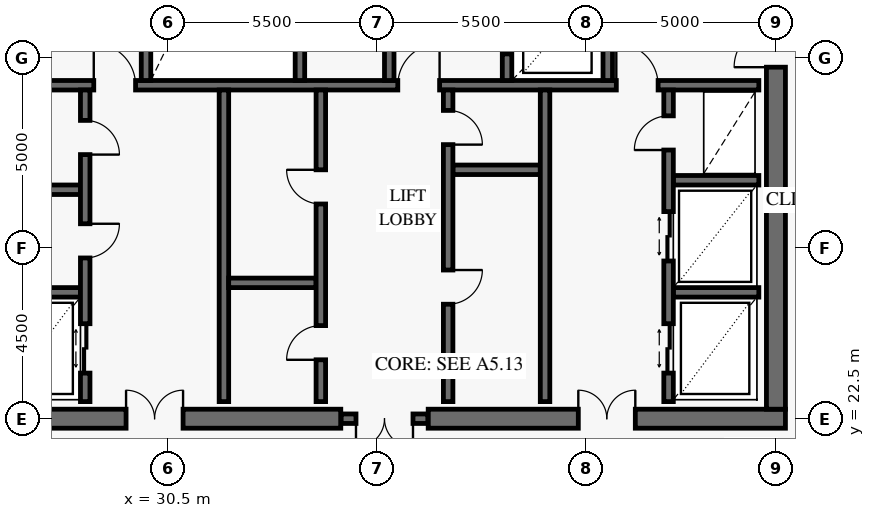
"""IFC4 building model, lengths in metres.
Left out: names, types, materials, properties, quantities, classifications, styles, units other than length and angle.
Written with IfcOpenShell. Run it as: python <this file> out.ifc"""

import sys

from ifc_helpers import new_model, si_unit, direction, frame, frame_2d, origin, place, context, subcontext, project, spatial, rectangle, extrude, element, fill, save


model = new_model("IFC4")
c1 = context("Model", 3, precision=1e-05, world=origin(), true_north=direction((0.0, 1.0)))
c2 = subcontext(c1, "Body", "Model", "MODEL_VIEW")
j1 = project(units=[si_unit("LENGTHUNIT", "METRE"), si_unit("PLANEANGLEUNIT", "RADIAN")], contexts=[c1])
p1 = place(None, origin())
s1 = spatial("IfcSite", under=j1, at=p1, CompositionType="ELEMENT")
p2 = place(p1, origin())
s2 = spatial("IfcBuilding", under=s1, at=p2, CompositionType="ELEMENT")
p3 = place(p2, frame((0.0, 0.0, 353.8)))
s3 = spatial("IfcBuildingStorey", under=s2, at=p3, CompositionType="ELEMENT", Elevation=353.8)
p4 = place(p3, frame((25.25, 22.5, 0.0), z_axis=(0.0, 0.0, 1.0), x_axis=(1.0, 0.0, 0.0)))
e1 = element("IfcWall", 1, at=p4, inside=s3, PredefinedType="SHEAR", context=c2, shape_type="SweptSolid", body=[
    extrude(rectangle(XDim=9.8, YDim=0.5, at=frame_2d((4.9, 0.0))), origin(), (0.0, 0.0, 1.0), 3.8),
])
p5 = place(p4, frame((4.15, 0.0, 0.0)))
e2 = element("IfcOpeningElement", 2, at=p5, cuts=e1, PredefinedType="OPENING", context=c2, shape_type="SweptSolid", body=[
    extrude(rectangle(XDim=1.5, YDim=2.15, at=frame_2d((0.75, 1.075))), frame((0.0, 0.262, 0.0), z_axis=(0.0, -1.0, 0.0), x_axis=(1.0, 0.0, 0.0)), (0.0, 0.0, 1.0), 0.524),
])
p6 = place(p3, frame((37.35, 22.5, 0.0), z_axis=(0.0, 0.0, 1.0), x_axis=(1.0, 0.0, 0.0)))
e3 = element("IfcWall", 3, at=p6, inside=s3, PredefinedType="SHEAR", context=c2, shape_type="SweptSolid", body=[
    extrude(rectangle(XDim=9.4, YDim=0.5, at=frame_2d((4.7, 0.0))), origin(), (0.0, 0.0, 1.0), 3.8),
])
p7 = place(p6, frame((3.95, 0.0, 0.0)))
e4 = element("IfcOpeningElement", 4, at=p7, cuts=e3, PredefinedType="OPENING", context=c2, shape_type="SweptSolid", body=[
    extrude(rectangle(XDim=1.5, YDim=2.15, at=frame_2d((0.75, 1.075))), frame((0.0, 0.262, 0.0), z_axis=(0.0, -1.0, 0.0), x_axis=(1.0, 0.0, 0.0)), (0.0, 0.0, 1.0), 0.524),
])
p8 = place(p3, frame((46.5, 22.75, 0.0), z_axis=(0.0, 0.0, 1.0), x_axis=(0.0, 1.0, 0.0)))
e5 = element("IfcWall", 5, at=p8, inside=s3, PredefinedType="SHEAR", context=c2, shape_type="SweptSolid", body=[
    extrude(rectangle(XDim=18.5, YDim=0.5, at=frame_2d((9.25, 0.0))), origin(), (0.0, 0.0, 1.0), 3.8),
])
p9 = place(p8, frame((9.0, 0.0, 0.0)))
e6 = element("IfcOpeningElement", 6, at=p9, cuts=e5, PredefinedType="OPENING", context=c2, shape_type="SweptSolid", body=[
    extrude(rectangle(XDim=1.1, YDim=2.15, at=frame_2d((0.55, 1.075))), frame((0.0, 0.262, 0.0), z_axis=(0.0, -1.0, 0.0), x_axis=(1.0, 0.0, 0.0)), (0.0, 0.0, 1.0), 0.524),
])
p10 = place(p3, frame((35.06, 22.5, 0.0), z_axis=(0.0, 0.0, 1.0), x_axis=(1.0, 0.0, 0.0)))
e7 = element("IfcWall", 7, at=p10, inside=s3, PredefinedType="SOLIDWALL", context=c2, shape_type="SweptSolid", body=[
    extrude(rectangle(XDim=2.28, YDim=0.25, at=frame_2d((1.14, 0.0))), origin(), (0.0, 0.0, 1.0), 3.8),
])
p11 = place(p10, frame((0.39, 0.0, 0.0)))
e8 = element("IfcOpeningElement", 8, at=p11, cuts=e7, PredefinedType="OPENING", context=c2, shape_type="SweptSolid", body=[
    extrude(rectangle(XDim=1.5, YDim=2.15, at=frame_2d((0.75, 1.075))), frame((0.0, 0.137, 0.0), z_axis=(0.0, -1.0, 0.0), x_axis=(1.0, 0.0, 0.0)), (0.0, 0.0, 1.0), 0.274),
])
p12 = place(p3, frame((25.95, 31.275, 0.0), z_axis=(0.0, 0.0, 1.0), x_axis=(1.0, 0.0, 0.0)))
e9 = element("IfcWall", 9, at=p12, inside=s3, PredefinedType="SOLIDWALL", context=c2, shape_type="SweptSolid", body=[
    extrude(rectangle(XDim=20.1, YDim=0.25, at=frame_2d((10.05, 0.0))), origin(), (0.0, 0.0, 1.0), 3.8),
])
p13 = place(p12, frame((2.6, 0.0, 0.0)))
e10 = element("IfcOpeningElement", 10, at=p13, cuts=e9, PredefinedType="OPENING", context=c2, shape_type="SweptSolid", body=[
    extrude(rectangle(XDim=1.1, YDim=2.15, at=frame_2d((0.55, 1.075))), frame((0.0, 0.137, 0.0), z_axis=(0.0, -1.0, 0.0), x_axis=(1.0, 0.0, 0.0)), (0.0, 0.0, 1.0), 0.274),
])
p14 = place(p12, frame((10.6, 0.0, 0.0)))
e11 = element("IfcOpeningElement", 11, at=p14, cuts=e9, PredefinedType="OPENING", context=c2, shape_type="SweptSolid", body=[
    extrude(rectangle(XDim=1.1, YDim=2.15, at=frame_2d((0.55, 1.075))), frame((0.0, 0.137, 0.0), z_axis=(0.0, -1.0, 0.0), x_axis=(1.0, 0.0, 0.0)), (0.0, 0.0, 1.0), 0.274),
])
p15 = place(p12, frame((16.35, 0.0, 0.0)))
e12 = element("IfcOpeningElement", 12, at=p15, cuts=e9, PredefinedType="OPENING", context=c2, shape_type="SweptSolid", body=[
    extrude(rectangle(XDim=1.1, YDim=2.15, at=frame_2d((0.55, 1.075))), frame((0.0, 0.137, 0.0), z_axis=(0.0, -1.0, 0.0), x_axis=(1.0, 0.0, 0.0)), (0.0, 0.0, 1.0), 0.274),
])
for number, where, z_axis, x_axis in (
    (13, (29.925, 31.4, 0.0), (0.0, 0.0, 1.0), (0.0, 1.0, 0.0)),
    (14, (33.975, 31.4, 0.0), (0.0, 0.0, 1.0), (0.0, 1.0, 0.0)),
    (15, (42.075, 31.4, 0.0), (0.0, 0.0, 1.0), (0.0, 1.0, 0.0)),
):
    element("IfcWall", number, at=place(p3, frame(where, z_axis=z_axis, x_axis=x_axis)), inside=s3, PredefinedType="SOLIDWALL", context=c2, shape_type="SweptSolid", body=[
        extrude(rectangle(XDim=9.7, YDim=0.25, at=frame_2d((4.85, 0.0))), origin(), (0.0, 0.0, 1.0), 3.8),
    ])
p16 = place(p3, frame((36.325, 31.4, 0.0), z_axis=(0.0, 0.0, 1.0), x_axis=(0.0, 1.0, 0.0)))
e16 = element("IfcWall", 16, at=p16, inside=s3, PredefinedType="SOLIDWALL", context=c2, shape_type="SweptSolid", body=[
    extrude(rectangle(XDim=9.65, YDim=0.25, at=frame_2d((4.825, 0.0))), origin(), (0.0, 0.0, 1.0), 3.8),
])
p17 = place(p16, frame((2.965, 0.0, 0.0)))
e17 = element("IfcOpeningElement", 17, at=p17, cuts=e16, PredefinedType="OPENING", context=c2, shape_type="SweptSolid", body=[
    extrude(rectangle(XDim=0.9, YDim=2.1, at=frame_2d((0.45, 1.05))), frame((0.0, 0.137, 0.0), z_axis=(0.0, -1.0, 0.0), x_axis=(1.0, 0.0, 0.0)), (0.0, 0.0, 1.0), 0.274),
])
p18 = place(p16, frame((7.885, 0.0, 0.0)))
e18 = element("IfcOpeningElement", 18, at=p18, cuts=e16, PredefinedType="OPENING", context=c2, shape_type="SweptSolid", body=[
    extrude(rectangle(XDim=0.9, YDim=2.1, at=frame_2d((0.45, 1.05))), frame((0.0, 0.137, 0.0), z_axis=(0.0, -1.0, 0.0), x_axis=(1.0, 0.0, 0.0)), (0.0, 0.0, 1.0), 0.274),
])
p19 = place(p3, frame((39.425, 31.4, 0.0), z_axis=(0.0, 0.0, 1.0), x_axis=(0.0, 1.0, 0.0)))
e19 = element("IfcWall", 19, at=p19, inside=s3, PredefinedType="SOLIDWALL", context=c2, shape_type="SweptSolid", body=[
    extrude(rectangle(XDim=9.65, YDim=0.25, at=frame_2d((4.825, 0.0))), origin(), (0.0, 0.0, 1.0), 3.8),
])
p20 = place(p19, frame((0.7, 0.0, 0.0)))
e20 = element("IfcOpeningElement", 20, at=p20, cuts=e19, PredefinedType="OPENING", context=c2, shape_type="SweptSolid", body=[
    extrude(rectangle(XDim=1.1, YDim=2.2, at=frame_2d((0.55, 1.1))), frame((0.0, 0.137, 0.0), z_axis=(0.0, -1.0, 0.0), x_axis=(1.0, 0.0, 0.0)), (0.0, 0.0, 1.0), 0.274),
])
p21 = place(p19, frame((3.45, 0.0, 0.0)))
e21 = element("IfcOpeningElement", 21, at=p21, cuts=e19, PredefinedType="OPENING", context=c2, shape_type="SweptSolid", body=[
    extrude(rectangle(XDim=1.1, YDim=2.2, at=frame_2d((0.55, 1.1))), frame((0.0, 0.137, 0.0), z_axis=(0.0, -1.0, 0.0), x_axis=(1.0, 0.0, 0.0)), (0.0, 0.0, 1.0), 0.274),
])
p22 = place(p19, frame((6.2, 0.0, 0.0)))
e22 = element("IfcOpeningElement", 22, at=p22, cuts=e19, PredefinedType="OPENING", context=c2, shape_type="SweptSolid", body=[
    extrude(rectangle(XDim=1.1, YDim=2.2, at=frame_2d((0.55, 1.1))), frame((0.0, 0.137, 0.0), z_axis=(0.0, -1.0, 0.0), x_axis=(1.0, 0.0, 0.0)), (0.0, 0.0, 1.0), 0.274),
])
p23 = place(p19, frame((8.47, 0.0, 0.0)))
e23 = element("IfcOpeningElement", 23, at=p23, cuts=e19, PredefinedType="OPENING", context=c2, shape_type="SweptSolid", body=[
    extrude(rectangle(XDim=0.9, YDim=2.1, at=frame_2d((0.45, 1.05))), frame((0.0, 0.137, 0.0), z_axis=(0.0, -1.0, 0.0), x_axis=(1.0, 0.0, 0.0)), (0.0, 0.0, 1.0), 0.274),
])
for number, where, z_axis, x_axis in (
    (24, (25.95, 25.825, 0.0), (0.0, 0.0, 1.0), (1.0, 0.0, 0.0)),
    (25, (25.95, 28.525, 0.0), (0.0, 0.0, 1.0), (1.0, 0.0, 0.0)),
):
    element("IfcWall", number, at=place(p3, frame(where, z_axis=z_axis, x_axis=x_axis)), inside=s3, PredefinedType="SOLIDWALL", context=c2, shape_type="SweptSolid", body=[
        extrude(rectangle(XDim=2.25, YDim=0.25, at=frame_2d((1.125, 0.0))), origin(), (0.0, 0.0, 1.0), 3.8),
    ])
p24 = place(p3, frame((28.325, 22.95, 0.0), z_axis=(0.0, 0.0, 1.0), x_axis=(0.0, 1.0, 0.0)))
e26 = element("IfcWall", 26, at=p24, inside=s3, PredefinedType="SOLIDWALL", context=c2, shape_type="SweptSolid", body=[
    extrude(rectangle(XDim=8.2, YDim=0.25, at=frame_2d((4.1, 0.0))), origin(), (0.0, 0.0, 1.0), 3.8),
])
p25 = place(p24, frame((0.75, 0.0, 0.0)))
e27 = element("IfcOpeningElement", 27, at=p25, cuts=e26, PredefinedType="OPENING", context=c2, shape_type="SweptSolid", body=[
    extrude(rectangle(XDim=1.3, YDim=2.3, at=frame_2d((0.65, 1.15))), frame((0.0, 0.137, 0.0), z_axis=(0.0, -1.0, 0.0), x_axis=(1.0, 0.0, 0.0)), (0.0, 0.0, 1.0), 0.274),
])
p26 = place(p24, frame((3.78, 0.0, 0.0)))
e28 = element("IfcOpeningElement", 28, at=p26, cuts=e26, PredefinedType="OPENING", context=c2, shape_type="SweptSolid", body=[
    extrude(rectangle(XDim=0.9, YDim=2.1, at=frame_2d((0.45, 1.05))), frame((0.0, 0.137, 0.0), z_axis=(0.0, -1.0, 0.0), x_axis=(1.0, 0.0, 0.0)), (0.0, 0.0, 1.0), 0.274),
])
p27 = place(p24, frame((6.5, 0.0, 0.0)))
e29 = element("IfcOpeningElement", 29, at=p27, cuts=e26, PredefinedType="OPENING", context=c2, shape_type="SweptSolid", body=[
    extrude(rectangle(XDim=0.9, YDim=2.1, at=frame_2d((0.45, 1.05))), frame((0.0, 0.137, 0.0), z_axis=(0.0, -1.0, 0.0), x_axis=(1.0, 0.0, 0.0)), (0.0, 0.0, 1.0), 0.274),
])
p28 = place(p3, frame((31.975, 22.95, 0.0), z_axis=(0.0, 0.0, 1.0), x_axis=(0.0, 1.0, 0.0)))
e30 = element("IfcWall", 30, at=p28, inside=s3, PredefinedType="SOLIDWALL", context=c2, shape_type="SweptSolid", body=[
    extrude(rectangle(XDim=8.2, YDim=0.25, at=frame_2d((4.1, 0.0))), origin(), (0.0, 0.0, 1.0), 3.8),
])
p29 = place(p3, frame((32.1, 26.075, 0.0), z_axis=(0.0, 0.0, 1.0), x_axis=(1.0, 0.0, 0.0)))
e31 = element("IfcWall", 31, at=p29, inside=s3, PredefinedType="SOLIDWALL", context=c2, shape_type="SweptSolid", body=[
    extrude(rectangle(XDim=2.3, YDim=0.25, at=frame_2d((1.15, 0.0))), origin(), (0.0, 0.0, 1.0), 3.8),
])
p30 = place(p3, frame((34.525, 22.95, 0.0), z_axis=(0.0, 0.0, 1.0), x_axis=(0.0, 1.0, 0.0)))
e32 = element("IfcWall", 32, at=p30, inside=s3, PredefinedType="SOLIDWALL", context=c2, shape_type="SweptSolid", body=[
    extrude(rectangle(XDim=8.2, YDim=0.25, at=frame_2d((4.1, 0.0))), origin(), (0.0, 0.0, 1.0), 3.8),
])
p31 = place(p30, frame((1.1, 0.0, 0.0)))
e33 = element("IfcOpeningElement", 33, at=p31, cuts=e32, PredefinedType="OPENING", context=c2, shape_type="SweptSolid", body=[
    extrude(rectangle(XDim=0.9, YDim=2.1, at=frame_2d((0.45, 1.05))), frame((0.0, 0.137, 0.0), z_axis=(0.0, -1.0, 0.0), x_axis=(1.0, 0.0, 0.0)), (0.0, 0.0, 1.0), 0.274),
])
p32 = place(p30, frame((5.2, 0.0, 0.0)))
e34 = element("IfcOpeningElement", 34, at=p32, cuts=e32, PredefinedType="OPENING", context=c2, shape_type="SweptSolid", body=[
    extrude(rectangle(XDim=0.9, YDim=2.1, at=frame_2d((0.45, 1.05))), frame((0.0, 0.137, 0.0), z_axis=(0.0, -1.0, 0.0), x_axis=(1.0, 0.0, 0.0)), (0.0, 0.0, 1.0), 0.274),
])
p33 = place(p3, frame((38.0, 29.05, 0.0), z_axis=(0.0, 0.0, 1.0), x_axis=(1.0, 0.0, 0.0)))
e35 = element("IfcWall", 35, at=p33, inside=s3, PredefinedType="SOLIDWALL", context=c2, shape_type="SweptSolid", body=[
    extrude(rectangle(XDim=2.3, YDim=0.25, at=frame_2d((1.15, 0.0))), origin(), (0.0, 0.0, 1.0), 3.8),
])
p34 = place(p3, frame((37.875, 22.95, 0.0), z_axis=(0.0, 0.0, 1.0), x_axis=(0.0, 1.0, 0.0)))
e36 = element("IfcWall", 36, at=p34, inside=s3, PredefinedType="SOLIDWALL", context=c2, shape_type="SweptSolid", body=[
    extrude(rectangle(XDim=8.2, YDim=0.25, at=frame_2d((4.1, 0.0))), origin(), (0.0, 0.0, 1.0), 3.8),
])
p35 = place(p34, frame((2.562, 0.0, 0.0)))
e37 = element("IfcOpeningElement", 37, at=p35, cuts=e36, PredefinedType="OPENING", context=c2, shape_type="SweptSolid", body=[
    extrude(rectangle(XDim=0.9, YDim=2.1, at=frame_2d((0.45, 1.05))), frame((0.0, 0.137, 0.0), z_axis=(0.0, -1.0, 0.0), x_axis=(1.0, 0.0, 0.0)), (0.0, 0.0, 1.0), 0.274),
])
p36 = place(p34, frame((6.762, 0.0, 0.0)))
e38 = element("IfcOpeningElement", 38, at=p36, cuts=e36, PredefinedType="OPENING", context=c2, shape_type="SweptSolid", body=[
    extrude(rectangle(XDim=0.9, YDim=2.1, at=frame_2d((0.45, 1.05))), frame((0.0, 0.137, 0.0), z_axis=(0.0, -1.0, 0.0), x_axis=(1.0, 0.0, 0.0)), (0.0, 0.0, 1.0), 0.274),
])
p37 = place(p3, frame((40.425, 22.95, 0.0), z_axis=(0.0, 0.0, 1.0), x_axis=(0.0, 1.0, 0.0)))
e39 = element("IfcWall", 39, at=p37, inside=s3, PredefinedType="SOLIDWALL", context=c2, shape_type="SweptSolid", body=[
    extrude(rectangle(XDim=8.2, YDim=0.25, at=frame_2d((4.1, 0.0))), origin(), (0.0, 0.0, 1.0), 3.8),
])
for number, where, z_axis, x_axis in (
    (40, (43.8, 25.825, 0.0), (0.0, 0.0, 1.0), (1.0, 0.0, 0.0)),
    (41, (43.8, 28.775, 0.0), (0.0, 0.0, 1.0), (1.0, 0.0, 0.0)),
):
    element("IfcWall", number, at=place(p3, frame(where, z_axis=z_axis, x_axis=x_axis)), inside=s3, PredefinedType="SOLIDWALL", context=c2, shape_type="SweptSolid", body=[
        extrude(rectangle(XDim=2.25, YDim=0.25, at=frame_2d((1.125, 0.0))), origin(), (0.0, 0.0, 1.0), 3.8),
    ])
p38 = place(p3, frame((43.675, 22.95, 0.0), z_axis=(0.0, 0.0, 1.0), x_axis=(0.0, 1.0, 0.0)))
e42 = element("IfcWall", 42, at=p38, inside=s3, PredefinedType="SOLIDWALL", context=c2, shape_type="SweptSolid", body=[
    extrude(rectangle(XDim=8.2, YDim=0.25, at=frame_2d((4.1, 0.0))), origin(), (0.0, 0.0, 1.0), 3.8),
])
p39 = place(p38, frame((0.75, 0.0, 0.0)))
e43 = element("IfcOpeningElement", 43, at=p39, cuts=e42, PredefinedType="OPENING", context=c2, shape_type="SweptSolid", body=[
    extrude(rectangle(XDim=1.3, YDim=2.3, at=frame_2d((0.65, 1.15))), frame((0.0, 0.137, 0.0), z_axis=(0.0, -1.0, 0.0), x_axis=(1.0, 0.0, 0.0)), (0.0, 0.0, 1.0), 0.274),
])
p40 = place(p38, frame((3.7, 0.0, 0.0)))
e44 = element("IfcOpeningElement", 44, at=p40, cuts=e42, PredefinedType="OPENING", context=c2, shape_type="SweptSolid", body=[
    extrude(rectangle(XDim=1.3, YDim=2.3, at=frame_2d((0.65, 1.15))), frame((0.0, 0.137, 0.0), z_axis=(0.0, -1.0, 0.0), x_axis=(1.0, 0.0, 0.0)), (0.0, 0.0, 1.0), 0.274),
])
p41 = place(p38, frame((6.62, 0.0, 0.0)))
e45 = element("IfcOpeningElement", 45, at=p41, cuts=e42, PredefinedType="OPENING", context=c2, shape_type="SweptSolid", body=[
    extrude(rectangle(XDim=0.9, YDim=2.1, at=frame_2d((0.45, 1.05))), frame((0.0, 0.137, 0.0), z_axis=(0.0, -1.0, 0.0), x_axis=(1.0, 0.0, 0.0)), (0.0, 0.0, 1.0), 0.274),
])
p42 = place(p9, origin())
e46 = element("IfcDoor", 46, at=p42, inside=s3, OperationType="SINGLE_SWING_LEFT", PredefinedType="USERDEFINED", context=c2, shape_type="SweptSolid", body=[
    extrude(rectangle(XDim=1.1, YDim=2.15, at=frame_2d((0.55, 1.075))), frame((0.0, 0.025, 0.0), z_axis=(0.0, -1.0, 0.0), x_axis=(1.0, 0.0, 0.0)), (0.0, 0.0, 1.0), 0.05),
])
fill(e6, e46)
p43 = place(p5, origin())
e47 = element("IfcDoor", 47, at=p43, inside=s3, OperationType="DOUBLE_DOOR_SINGLE_SWING", PredefinedType="DOOR", context=c2, shape_type="SweptSolid", body=[
    extrude(rectangle(XDim=1.5, YDim=2.15, at=frame_2d((0.75, 1.075))), frame((0.0, 0.025, 0.0), z_axis=(0.0, -1.0, 0.0), x_axis=(1.0, 0.0, 0.0)), (0.0, 0.0, 1.0), 0.05),
])
fill(e2, e47)
p44 = place(p7, origin())
e48 = element("IfcDoor", 48, at=p44, inside=s3, OperationType="DOUBLE_DOOR_SINGLE_SWING", PredefinedType="DOOR", context=c2, shape_type="SweptSolid", body=[
    extrude(rectangle(XDim=1.5, YDim=2.15, at=frame_2d((0.75, 1.075))), frame((0.0, 0.025, 0.0), z_axis=(0.0, -1.0, 0.0), x_axis=(1.0, 0.0, 0.0)), (0.0, 0.0, 1.0), 0.05),
])
fill(e4, e48)
p45 = place(p11, frame((1.5, 0.0, 0.0), z_axis=(0.0, 0.0, 1.0), x_axis=(-1.0, 0.0, 0.0)))
e49 = element("IfcDoor", 49, at=p45, inside=s3, OperationType="DOUBLE_DOOR_SINGLE_SWING", PredefinedType="DOOR", context=c2, shape_type="SweptSolid", body=[
    extrude(rectangle(XDim=1.5, YDim=2.15, at=frame_2d((0.75, 1.075))), frame((0.0, 0.025, 0.0), z_axis=(0.0, -1.0, 0.0), x_axis=(1.0, 0.0, 0.0)), (0.0, 0.0, 1.0), 0.05),
])
fill(e8, e49)
p46 = place(p13, origin())
e50 = element("IfcDoor", 50, at=p46, inside=s3, OperationType="SINGLE_SWING_LEFT", PredefinedType="USERDEFINED", context=c2, shape_type="SweptSolid", body=[
    extrude(rectangle(XDim=1.1, YDim=2.15, at=frame_2d((0.55, 1.075))), frame((0.0, 0.025, 0.0), z_axis=(0.0, -1.0, 0.0), x_axis=(1.0, 0.0, 0.0)), (0.0, 0.0, 1.0), 0.05),
])
fill(e10, e50)
p47 = place(p14, origin())
e51 = element("IfcDoor", 51, at=p47, inside=s3, OperationType="SINGLE_SWING_RIGHT", PredefinedType="USERDEFINED", context=c2, shape_type="SweptSolid", body=[
    extrude(rectangle(XDim=1.1, YDim=2.15, at=frame_2d((0.55, 1.075))), frame((0.0, 0.025, 0.0), z_axis=(0.0, -1.0, 0.0), x_axis=(1.0, 0.0, 0.0)), (0.0, 0.0, 1.0), 0.05),
])
fill(e11, e51)
p48 = place(p15, origin())
e52 = element("IfcDoor", 52, at=p48, inside=s3, OperationType="SINGLE_SWING_LEFT", PredefinedType="USERDEFINED", context=c2, shape_type="SweptSolid", body=[
    extrude(rectangle(XDim=1.1, YDim=2.15, at=frame_2d((0.55, 1.075))), frame((0.0, 0.025, 0.0), z_axis=(0.0, -1.0, 0.0), x_axis=(1.0, 0.0, 0.0)), (0.0, 0.0, 1.0), 0.05),
])
fill(e12, e52)
p49 = place(p20, origin())
e53 = element("IfcDoor", 53, at=p49, inside=s3, OperationType="DOUBLE_DOOR_SLIDING", PredefinedType="DOOR", context=c2, shape_type="SweptSolid", body=[
    extrude(rectangle(XDim=1.1, YDim=2.2, at=frame_2d((0.55, 1.1))), frame((0.0, 0.025, 0.0), z_axis=(0.0, -1.0, 0.0), x_axis=(1.0, 0.0, 0.0)), (0.0, 0.0, 1.0), 0.05),
])
fill(e20, e53)
p50 = place(p25, frame((1.3, 0.0, 0.0), z_axis=(0.0, 0.0, 1.0), x_axis=(-1.0, 0.0, 0.0)))
e54 = element("IfcDoor", 54, at=p50, inside=s3, OperationType="DOUBLE_DOOR_SLIDING", PredefinedType="DOOR", context=c2, shape_type="SweptSolid", body=[
    extrude(rectangle(XDim=1.3, YDim=2.3, at=frame_2d((0.65, 1.15))), frame((0.0, 0.025, 0.0), z_axis=(0.0, -1.0, 0.0), x_axis=(1.0, 0.0, 0.0)), (0.0, 0.0, 1.0), 0.05),
])
fill(e27, e54)
p51 = place(p26, frame((0.9, 0.0, 0.0), z_axis=(0.0, 0.0, 1.0), x_axis=(-1.0, 0.0, 0.0)))
e55 = element("IfcDoor", 55, at=p51, inside=s3, OperationType="SINGLE_SWING_LEFT", PredefinedType="DOOR", context=c2, shape_type="SweptSolid", body=[
    extrude(rectangle(XDim=0.9, YDim=2.1, at=frame_2d((0.45, 1.05))), frame((0.0, 0.025, 0.0), z_axis=(0.0, -1.0, 0.0), x_axis=(1.0, 0.0, 0.0)), (0.0, 0.0, 1.0), 0.05),
])
fill(e28, e55)
p52 = place(p27, frame((0.9, 0.0, 0.0), z_axis=(0.0, 0.0, 1.0), x_axis=(-1.0, 0.0, 0.0)))
e56 = element("IfcDoor", 56, at=p52, inside=s3, OperationType="SINGLE_SWING_RIGHT", PredefinedType="DOOR", context=c2, shape_type="SweptSolid", body=[
    extrude(rectangle(XDim=0.9, YDim=2.1, at=frame_2d((0.45, 1.05))), frame((0.0, 0.025, 0.0), z_axis=(0.0, -1.0, 0.0), x_axis=(1.0, 0.0, 0.0)), (0.0, 0.0, 1.0), 0.05),
])
fill(e29, e56)
p53 = place(p31, origin())
e57 = element("IfcDoor", 57, at=p53, inside=s3, OperationType="SINGLE_SWING_LEFT", PredefinedType="DOOR", context=c2, shape_type="SweptSolid", body=[
    extrude(rectangle(XDim=0.9, YDim=2.1, at=frame_2d((0.45, 1.05))), frame((0.0, 0.025, 0.0), z_axis=(0.0, -1.0, 0.0), x_axis=(1.0, 0.0, 0.0)), (0.0, 0.0, 1.0), 0.05),
])
fill(e33, e57)
p54 = place(p32, origin())
e58 = element("IfcDoor", 58, at=p54, inside=s3, OperationType="SINGLE_SWING_RIGHT", PredefinedType="DOOR", context=c2, shape_type="SweptSolid", body=[
    extrude(rectangle(XDim=0.9, YDim=2.1, at=frame_2d((0.45, 1.05))), frame((0.0, 0.025, 0.0), z_axis=(0.0, -1.0, 0.0), x_axis=(1.0, 0.0, 0.0)), (0.0, 0.0, 1.0), 0.05),
])
fill(e34, e58)
p55 = place(p35, frame((0.9, 0.0, 0.0), z_axis=(0.0, 0.0, 1.0), x_axis=(-1.0, 0.0, 0.0)))
e59 = element("IfcDoor", 59, at=p55, inside=s3, OperationType="SINGLE_SWING_LEFT", PredefinedType="DOOR", context=c2, shape_type="SweptSolid", body=[
    extrude(rectangle(XDim=0.9, YDim=2.1, at=frame_2d((0.45, 1.05))), frame((0.0, 0.025, 0.0), z_axis=(0.0, -1.0, 0.0), x_axis=(1.0, 0.0, 0.0)), (0.0, 0.0, 1.0), 0.05),
])
fill(e37, e59)
p56 = place(p36, frame((0.9, 0.0, 0.0), z_axis=(0.0, 0.0, 1.0), x_axis=(-1.0, 0.0, 0.0)))
e60 = element("IfcDoor", 60, at=p56, inside=s3, OperationType="SINGLE_SWING_RIGHT", PredefinedType="DOOR", context=c2, shape_type="SweptSolid", body=[
    extrude(rectangle(XDim=0.9, YDim=2.1, at=frame_2d((0.45, 1.05))), frame((0.0, 0.025, 0.0), z_axis=(0.0, -1.0, 0.0), x_axis=(1.0, 0.0, 0.0)), (0.0, 0.0, 1.0), 0.05),
])
fill(e38, e60)
p57 = place(p39, origin())
e61 = element("IfcDoor", 61, at=p57, inside=s3, OperationType="DOUBLE_DOOR_SLIDING", PredefinedType="DOOR", context=c2, shape_type="SweptSolid", body=[
    extrude(rectangle(XDim=1.3, YDim=2.3, at=frame_2d((0.65, 1.15))), frame((0.0, 0.025, 0.0), z_axis=(0.0, -1.0, 0.0), x_axis=(1.0, 0.0, 0.0)), (0.0, 0.0, 1.0), 0.05),
])
fill(e43, e61)
p58 = place(p40, origin())
e62 = element("IfcDoor", 62, at=p58, inside=s3, OperationType="DOUBLE_DOOR_SLIDING", PredefinedType="DOOR", context=c2, shape_type="SweptSolid", body=[
    extrude(rectangle(XDim=1.3, YDim=2.3, at=frame_2d((0.65, 1.15))), frame((0.0, 0.025, 0.0), z_axis=(0.0, -1.0, 0.0), x_axis=(1.0, 0.0, 0.0)), (0.0, 0.0, 1.0), 0.05),
])
fill(e44, e62)
p59 = place(p41, origin())
e63 = element("IfcDoor", 63, at=p59, inside=s3, OperationType="SINGLE_SWING_LEFT", PredefinedType="DOOR", context=c2, shape_type="SweptSolid", body=[
    extrude(rectangle(XDim=0.9, YDim=2.1, at=frame_2d((0.45, 1.05))), frame((0.0, 0.025, 0.0), z_axis=(0.0, -1.0, 0.0), x_axis=(1.0, 0.0, 0.0)), (0.0, 0.0, 1.0), 0.05),
])
fill(e45, e63)
save(model, sys.argv[1])
